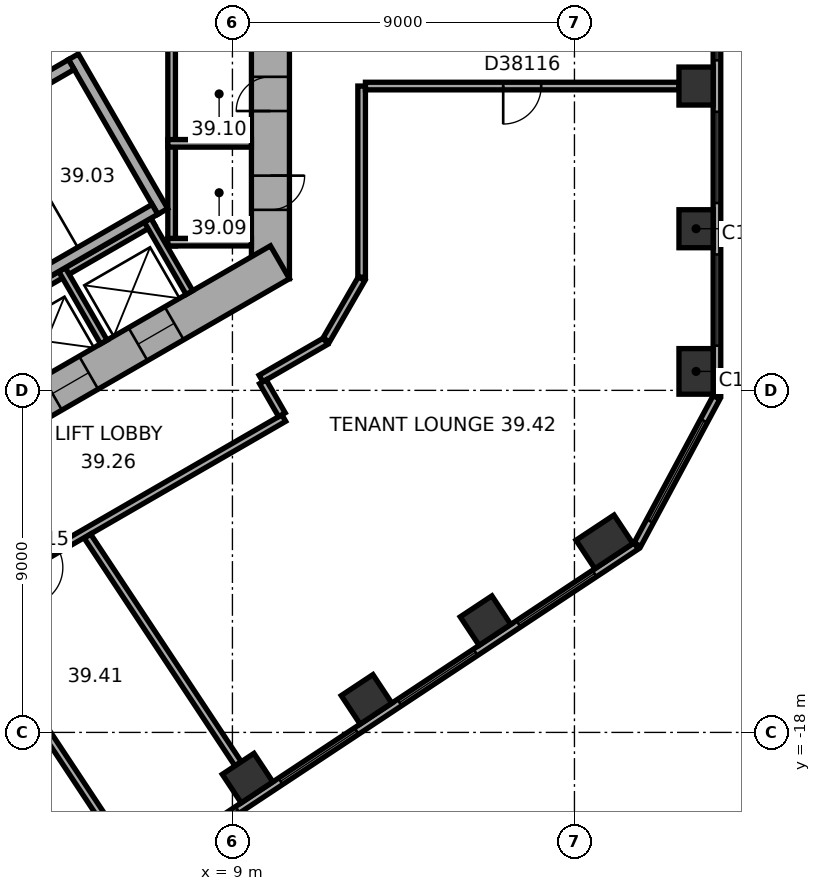
"""IFC4 building model, lengths in metres.
Left out: names, types, materials, properties, quantities, classifications, styles, units other than length and angle.
Written with IfcOpenShell. Run it as: python <this file> out.ifc"""

import sys

from ifc_helpers import new_model, si_unit, direction, frame, frame_2d, origin, origin_2d, place, context, subcontext, project, spatial, rectangle, extrude, element, fill, save


model = new_model("IFC4")
c1 = context("Model", 3, precision=1e-05, world=origin(), true_north=direction((0.0, 1.0)))
c2 = subcontext(c1, "Body", "Model", "MODEL_VIEW")
j1 = project(units=[si_unit("LENGTHUNIT", "METRE"), si_unit("PLANEANGLEUNIT", "RADIAN")], contexts=[c1])
p1 = place(None, origin())
s1 = spatial("IfcSite", under=j1, at=p1, CompositionType="ELEMENT")
p2 = place(p1, origin())
s2 = spatial("IfcBuilding", under=s1, at=p2, CompositionType="ELEMENT")
p3 = place(p2, frame((0.0, 0.0, 161.4)))
s3 = spatial("IfcBuildingStorey", under=s2, at=p3, CompositionType="ELEMENT", Elevation=161.4)
p4 = place(p3, frame((21.2, -8.501, 0.0), z_axis=(0.0, 0.0, 1.0), x_axis=(0.0, 1.0, 0.0)))
e1 = element("IfcColumn", 1, at=p4, inside=s3, PredefinedType="COLUMN", context=c2, shape_type="SweptSolid", body=[
    extrude(rectangle(XDim=1.2, YDim=0.9, at=origin_2d()), origin(), (0.0, 0.0, 1.0), 3.7),
])
for number, where, z_axis, x_axis in (
    (2, (21.2, -4.747, 0.0), (0.0, 0.0, 1.0), (0.0, 1.0, 0.0)),
    (3, (21.2, -0.993, 0.0), (0.0, 0.0, 1.0), (0.0, 1.0, 0.0)),
    (4, (9.398, -19.202, 0.0), (0.0, 0.0, 1.0), (0.834, 0.552, 0.0)),
    (5, (12.529, -17.13, 0.0), (0.0, 0.0, 1.0), (0.834, 0.552, 0.0)),
    (6, (15.659, -15.058, 0.0), (0.0, 0.0, 1.0), (0.834, 0.552, 0.0)),
):
    element("IfcColumn", number, at=place(p3, frame(where, z_axis=z_axis, x_axis=x_axis)), inside=s3, PredefinedType="COLUMN", context=c2, shape_type="SweptSolid", body=[
        extrude(rectangle(XDim=1.0, YDim=0.9, at=origin_2d()), origin(), (0.0, 0.0, 1.0), 3.7),
    ])
p5 = place(p3, frame((18.79, -12.986, 0.0), z_axis=(0.0, 0.0, 1.0), x_axis=(0.833885822067, 0.551936985312, 0.0)))
e7 = element("IfcColumn", 7, at=p5, inside=s3, PredefinedType="COLUMN", context=c2, shape_type="SweptSolid", body=[
    extrude(rectangle(XDim=1.2, YDim=0.9, at=origin_2d()), origin(), (0.0, 0.0, 1.0), 3.7),
])
p6 = place(p3, frame((10.0, -6.062, 0.0), z_axis=(0.0, 0.0, 1.0), x_axis=(0.0, 1.0, 0.0)))
e8 = element("IfcWall", 8, at=p6, inside=s3, PredefinedType="SHEAR", context=c2, shape_type="SweptSolid", body=[
    extrude(rectangle(XDim=12.125, YDim=1.0, at=frame_2d((6.062, 0.0))), origin(), (0.0, 0.0, 1.0), 3.7),
])
p7 = place(p6, frame((6.262, 0.0, 0.0)))
e9 = element("IfcOpeningElement", 9, at=p7, cuts=e8, PredefinedType="OPENING", context=c2, shape_type="SweptSolid", body=[
    extrude(rectangle(XDim=1.5, YDim=2.1, at=frame_2d((0.75, 1.05))), frame((0.0, 0.51, 0.0), z_axis=(0.0, -1.0, 0.0), x_axis=(1.0, 0.0, 0.0)), (0.0, 0.0, 1.0), 1.02),
])
p8 = place(p6, frame((1.812, 0.0, 0.0)))
e10 = element("IfcOpeningElement", 10, at=p8, cuts=e8, PredefinedType="OPENING", context=c2, shape_type="SweptSolid", body=[
    extrude(rectangle(XDim=0.9, YDim=2.1, at=frame_2d((0.45, 1.05))), frame((0.0, 0.51, 0.0), z_axis=(0.0, -1.0, 0.0), x_axis=(1.0, 0.0, 0.0)), (0.0, 0.0, 1.0), 1.02),
])
p9 = place(p6, frame((4.412, 0.0, 0.0)))
e11 = element("IfcOpeningElement", 11, at=p9, cuts=e8, PredefinedType="OPENING", context=c2, shape_type="SweptSolid", body=[
    extrude(rectangle(XDim=0.9, YDim=2.1, at=frame_2d((0.45, 1.05))), frame((0.0, 0.51, 0.0), z_axis=(0.0, -1.0, 0.0), x_axis=(1.0, 0.0, 0.0)), (0.0, 0.0, 1.0), 1.02),
])
p10 = place(p3, frame((-0.25, -11.691, 0.0), z_axis=(0.0, 0.0, 1.0), x_axis=(0.866022616891, 0.50000482701, 0.0)))
e12 = element("IfcWall", 12, at=p10, inside=s3, PredefinedType="SHEAR", context=c2, shape_type="SweptSolid", body=[
    extrude(rectangle(XDim=12.125, YDim=1.0, at=frame_2d((6.062, 0.0))), origin(), (0.0, 0.0, 1.0), 3.7),
])
p11 = place(p10, frame((2.612, 0.0, 0.0)))
e13 = element("IfcOpeningElement", 13, at=p11, cuts=e12, PredefinedType="OPENING", context=c2, shape_type="SweptSolid", body=[
    extrude(rectangle(XDim=1.1, YDim=2.1, at=frame_2d((0.55, 1.05))), frame((0.0, 0.51, 0.0), z_axis=(0.0, -1.0, 0.0), x_axis=(1.0, 0.0, 0.0)), (0.0, 0.0, 1.0), 1.02),
])
p12 = place(p10, frame((5.212, 0.0, 0.0)))
e14 = element("IfcOpeningElement", 14, at=p12, cuts=e12, PredefinedType="OPENING", context=c2, shape_type="SweptSolid", body=[
    extrude(rectangle(XDim=1.1, YDim=2.1, at=frame_2d((0.55, 1.05))), frame((0.0, 0.51, 0.0), z_axis=(0.0, -1.0, 0.0), x_axis=(1.0, 0.0, 0.0)), (0.0, 0.0, 1.0), 1.02),
])
p13 = place(p10, frame((7.812, 0.0, 0.0)))
e15 = element("IfcOpeningElement", 15, at=p13, cuts=e12, PredefinedType="OPENING", context=c2, shape_type="SweptSolid", body=[
    extrude(rectangle(XDim=1.1, YDim=2.1, at=frame_2d((0.55, 1.05))), frame((0.0, 0.51, 0.0), z_axis=(0.0, -1.0, 0.0), x_axis=(1.0, 0.0, 0.0)), (0.0, 0.0, 1.0), 1.02),
])
p14 = place(p3, frame((21.75, -9.138, 0.0), z_axis=(0.0, 0.0, 1.0), x_axis=(0.0, 1.0, 0.0)))
e16 = element("IfcWall", 16, at=p14, inside=s3, PredefinedType="STANDARD", context=c2, shape_type="SweptSolid", body=[
    extrude(rectangle(XDim=20.044, YDim=0.2, at=frame_2d((10.022, 0.0))), origin(), (0.0, 0.0, 1.0), 3.7),
])
p15 = place(p14, frame((1.314, 0.0, 0.9)))
e17 = element("IfcOpeningElement", 17, at=p15, cuts=e16, PredefinedType="OPENING", context=c2, shape_type="SweptSolid", body=[
    extrude(rectangle(XDim=2.4, YDim=2.0, at=frame_2d((1.2, 1.0))), frame((0.0, 0.11, 0.0), z_axis=(0.0, -1.0, 0.0), x_axis=(1.0, 0.0, 0.0)), (0.0, 0.0, 1.0), 0.22),
])
p16 = place(p14, frame((5.069, 0.0, 0.9)))
e18 = element("IfcOpeningElement", 18, at=p16, cuts=e16, PredefinedType="OPENING", context=c2, shape_type="SweptSolid", body=[
    extrude(rectangle(XDim=2.4, YDim=2.0, at=frame_2d((1.2, 1.0))), frame((0.0, 0.11, 0.0), z_axis=(0.0, -1.0, 0.0), x_axis=(1.0, 0.0, 0.0)), (0.0, 0.0, 1.0), 0.22),
])
p17 = place(p14, frame((8.823, 0.0, 0.9)))
e19 = element("IfcOpeningElement", 19, at=p17, cuts=e16, PredefinedType="OPENING", context=c2, shape_type="SweptSolid", body=[
    extrude(rectangle(XDim=2.4, YDim=2.0, at=frame_2d((1.2, 1.0))), frame((0.0, 0.11, 0.0), z_axis=(0.0, -1.0, 0.0), x_axis=(1.0, 0.0, 0.0)), (0.0, 0.0, 1.0), 0.22),
])
p18 = place(p14, frame((12.577, 0.0, 0.9)))
e20 = element("IfcOpeningElement", 20, at=p18, cuts=e16, PredefinedType="OPENING", context=c2, shape_type="SweptSolid", body=[
    extrude(rectangle(XDim=2.4, YDim=2.0, at=frame_2d((1.2, 1.0))), frame((0.0, 0.11, 0.0), z_axis=(0.0, -1.0, 0.0), x_axis=(1.0, 0.0, 0.0)), (0.0, 0.0, 1.0), 0.22),
])
p19 = place(p14, frame((16.331, 0.0, 0.9)))
e21 = element("IfcOpeningElement", 21, at=p19, cuts=e16, PredefinedType="OPENING", context=c2, shape_type="SweptSolid", body=[
    extrude(rectangle(XDim=2.4, YDim=2.0, at=frame_2d((1.2, 1.0))), frame((0.0, 0.11, 0.0), z_axis=(0.0, -1.0, 0.0), x_axis=(1.0, 0.0, 0.0)), (0.0, 0.0, 1.0), 0.22),
])
p20 = place(p3, frame((2.911, -24.156, 0.0), z_axis=(0.0, 0.0, 1.0), x_axis=(0.833882163564, 0.551942512668, 0.0)))
e22 = element("IfcWall", 22, at=p20, inside=s3, PredefinedType="STANDARD", context=c2, shape_type="SweptSolid", body=[
    extrude(rectangle(XDim=20.044, YDim=0.2, at=frame_2d((10.022, 0.0))), origin(), (0.0, 0.0, 1.0), 3.7),
])
p21 = place(p20, frame((1.313, 0.0, 0.9)))
e23 = element("IfcOpeningElement", 23, at=p21, cuts=e22, PredefinedType="OPENING", context=c2, shape_type="SweptSolid", body=[
    extrude(rectangle(XDim=2.4, YDim=2.0, at=frame_2d((1.2, 1.0))), frame((0.0, 0.11, 0.0), z_axis=(0.0, -1.0, 0.0), x_axis=(1.0, 0.0, 0.0)), (0.0, 0.0, 1.0), 0.22),
])
p22 = place(p20, frame((5.067, 0.0, 0.9)))
e24 = element("IfcOpeningElement", 24, at=p22, cuts=e22, PredefinedType="OPENING", context=c2, shape_type="SweptSolid", body=[
    extrude(rectangle(XDim=2.4, YDim=2.0, at=frame_2d((1.2, 1.0))), frame((0.0, 0.11, 0.0), z_axis=(0.0, -1.0, 0.0), x_axis=(1.0, 0.0, 0.0)), (0.0, 0.0, 1.0), 0.22),
])
p23 = place(p20, frame((8.821, 0.0, 0.9)))
e25 = element("IfcOpeningElement", 25, at=p23, cuts=e22, PredefinedType="OPENING", context=c2, shape_type="SweptSolid", body=[
    extrude(rectangle(XDim=2.4, YDim=2.0, at=frame_2d((1.2, 1.0))), frame((0.0, 0.11, 0.0), z_axis=(0.0, -1.0, 0.0), x_axis=(1.0, 0.0, 0.0)), (0.0, 0.0, 1.0), 0.22),
])
p24 = place(p20, frame((12.575, 0.0, 0.9)))
e26 = element("IfcOpeningElement", 26, at=p24, cuts=e22, PredefinedType="OPENING", context=c2, shape_type="SweptSolid", body=[
    extrude(rectangle(XDim=2.4, YDim=2.0, at=frame_2d((1.2, 1.0))), frame((0.0, 0.11, 0.0), z_axis=(0.0, -1.0, 0.0), x_axis=(1.0, 0.0, 0.0)), (0.0, 0.0, 1.0), 0.22),
])
p25 = place(p20, frame((16.329, 0.0, 0.9)))
e27 = element("IfcOpeningElement", 27, at=p25, cuts=e22, PredefinedType="OPENING", context=c2, shape_type="SweptSolid", body=[
    extrude(rectangle(XDim=2.4, YDim=2.0, at=frame_2d((1.2, 1.0))), frame((0.0, 0.11, 0.0), z_axis=(0.0, -1.0, 0.0), x_axis=(1.0, 0.0, 0.0)), (0.0, 0.0, 1.0), 0.22),
])
p26 = place(p3, frame((19.658, -13.057, 0.0), z_axis=(0.0, 0.0, 1.0), x_axis=(0.473307879841, 0.880897071672, 0.0)))
e28 = element("IfcWall", 28, at=p26, inside=s3, PredefinedType="STANDARD", context=c2, shape_type="SweptSolid", body=[
    extrude(rectangle(XDim=4.395, YDim=0.2, at=frame_2d((2.197, 0.0))), origin(), (0.0, 0.0, 1.0), 3.7),
])
p27 = place(p26, frame((0.698, 0.0, 0.9)))
e29 = element("IfcOpeningElement", 29, at=p27, cuts=e28, PredefinedType="OPENING", context=c2, shape_type="SweptSolid", body=[
    extrude(rectangle(XDim=3.0, YDim=2.0, at=frame_2d((1.5, 1.0))), frame((0.0, 0.11, 0.0), z_axis=(0.0, -1.0, 0.0), x_axis=(1.0, 0.0, 0.0)), (0.0, 0.0, 1.0), 0.22),
])
p28 = place(p3, frame((7.4, -5.2, 0.0), z_axis=(0.0, 0.0, 1.0), x_axis=(0.0, 1.0, 0.0)))
e30 = element("IfcWall", 30, at=p28, inside=s3, PredefinedType="PARTITIONING", context=c2, shape_type="SweptSolid", body=[
    extrude(rectangle(XDim=5.4, YDim=0.2, at=frame_2d((2.7, 0.0))), origin(), (0.0, 0.0, 1.0), 3.42),
])
for number, where, z_axis, x_axis in (
    (31, (7.3, -5.1, 0.0), (0.0, 0.0, 1.0), (1.0, 0.0, 0.0)),
    (32, (7.3, -2.5, 0.0), (0.0, 0.0, 1.0), (1.0, 0.0, 0.0)),
):
    element("IfcWall", number, at=place(p3, frame(where, z_axis=z_axis, x_axis=x_axis)), inside=s3, PredefinedType="PARTITIONING", context=c2, shape_type="SweptSolid", body=[
        extrude(rectangle(XDim=2.2, YDim=0.2, at=frame_2d((1.1, 0.0))), origin(), (0.0, 0.0, 1.0), 3.42),
    ])
p29 = place(p3, frame((-0.024, -8.559, 0.0), z_axis=(0.0, 0.0, 1.0), x_axis=(0.866026010844, 0.49999894854, 0.0)))
e33 = element("IfcWall", 33, at=p29, inside=s3, PredefinedType="PARTITIONING", context=c2, shape_type="SweptSolid", body=[
    extrude(rectangle(XDim=8.0, YDim=0.2, at=frame_2d((4.0, 0.0))), origin(), (0.0, 0.0, 1.0), 3.42),
])
for number, where, z_axis, x_axis in (
    (34, (4.516, -5.822, 0.0), (0.0, 0.0, 1.0), (0.5, -0.866, 0.0)),
    (35, (6.768, -4.522, 0.0), (0.0, 0.0, 1.0), (0.5, -0.866, 0.0)),
):
    element("IfcWall", number, at=place(p3, frame(where, z_axis=z_axis, x_axis=x_axis)), inside=s3, PredefinedType="PARTITIONING", context=c2, shape_type="SweptSolid", body=[
        extrude(rectangle(XDim=2.2, YDim=0.2, at=frame_2d((1.1, 0.0))), origin(), (0.0, 0.0, 1.0), 3.42),
    ])
p30 = place(p3, frame((4.816, -0.222, 0.0), z_axis=(0.0, 0.0, 1.0), x_axis=(0.499977259774, -0.866038532462, 0.0)))
e36 = element("IfcWall", 36, at=p30, inside=s3, PredefinedType="SHEAR", context=c2, shape_type="SweptSolid", body=[
    extrude(rectangle(XDim=4.7, YDim=0.3, at=frame_2d((2.35, 0.0))), origin(), (0.0, 0.0, 1.0), 3.42),
])
for number, where, z_axis, x_axis in (
    (37, (-1.353, -3.957, 0.0), (0.0, 0.0, 1.0), (0.866, 0.5, 0.0)),
    (38, (0.847, -7.767, 0.0), (0.0, 0.0, 1.0), (0.866, 0.5, 0.0)),
):
    element("IfcWall", number, at=place(p3, frame(where, z_axis=z_axis, x_axis=x_axis)), inside=s3, PredefinedType="SHEAR", context=c2, shape_type="SweptSolid", body=[
        extrude(rectangle(XDim=7.06, YDim=0.3, at=frame_2d((3.53, 0.0))), origin(), (0.0, 0.0, 1.0), 3.42),
    ])
p31 = place(p3, frame((2.816, -14.079, 0.0), z_axis=(0.0, 0.0, 1.0), x_axis=(0.866021128829, 0.500007404367, 0.0)))
e39 = element("IfcWall", 39, at=p31, inside=s3, PredefinedType="PARTITIONING", context=c2, shape_type="SweptSolid", body=[
    extrude(rectangle(XDim=8.702, YDim=0.2, at=frame_2d((4.351, 0.0))), origin(), (0.0, 0.0, 1.0), 3.42),
])
p32 = place(p31, frame((0.833, 0.0, 0.0)))
e40 = element("IfcOpeningElement", 40, at=p32, cuts=e39, PredefinedType="OPENING", context=c2, shape_type="SweptSolid", body=[
    extrude(rectangle(XDim=1.0, YDim=2.1, at=frame_2d((0.5, 1.05))), frame((0.0, 0.11, 0.0), z_axis=(0.0, -1.0, 0.0), x_axis=(1.0, 0.0, 0.0)), (0.0, 0.0, 1.0), 0.22),
])
p33 = place(p3, frame((6.02, -20.899, 0.0), z_axis=(0.0, 0.0, 1.0), x_axis=(-0.551943990108, 0.833881185651, 0.0)))
e41 = element("IfcWall", 41, at=p33, inside=s3, PredefinedType="PARTITIONING", context=c2, shape_type="SweptSolid", body=[
    extrude(rectangle(XDim=8.615, YDim=0.2, at=frame_2d((4.308, 0.0))), origin(), (0.0, 0.0, 1.0), 3.42),
])
p34 = place(p3, frame((9.15, -18.827, 0.0), z_axis=(0.0, 0.0, 1.0), x_axis=(-0.551928083938, 0.83389171369, 0.0)))
e42 = element("IfcWall", 42, at=p34, inside=s3, PredefinedType="PARTITIONING", context=c2, shape_type="SweptSolid", body=[
    extrude(rectangle(XDim=7.182, YDim=0.2, at=frame_2d((3.591, 0.0))), origin(), (0.0, 0.0, 1.0), 2.87),
])
p35 = place(p3, frame((9.752, -8.688, 0.0), z_axis=(0.0, 0.0, 1.0), x_axis=(0.865974105138, 0.500088841337, 0.0)))
e43 = element("IfcWall", 43, at=p35, inside=s3, PredefinedType="PARTITIONING", context=c2, shape_type="SweptSolid", body=[
    extrude(rectangle(XDim=1.961, YDim=0.2, at=frame_2d((0.98, 0.0))), origin(), (0.0, 0.0, 1.0), 3.42),
])
p36 = place(p3, frame((10.302, -9.642, 0.0), z_axis=(0.0, 0.0, 1.0), x_axis=(-0.500074377092, 0.865982457891, 0.0)))
e44 = element("IfcWall", 44, at=p36, inside=s3, PredefinedType="PARTITIONING", context=c2, shape_type="SweptSolid", body=[
    extrude(rectangle(XDim=1.001, YDim=0.2, at=frame_2d((0.5, 0.0))), origin(), (0.0, 0.0, 1.0), 3.42),
])
p37 = place(p3, frame((11.47, -7.673, 0.0), z_axis=(0.0, 0.0, 1.0), x_axis=(0.499964847546, 0.866045698112, 0.0)))
e45 = element("IfcWall", 45, at=p37, inside=s3, PredefinedType="PARTITIONING", context=c2, shape_type="SweptSolid", body=[
    extrude(rectangle(XDim=1.86, YDim=0.2, at=frame_2d((0.93, 0.0))), origin(), (0.0, 0.0, 1.0), 3.42),
])
p38 = place(p3, frame((12.4, -6.022, 0.0), z_axis=(0.0, 0.0, 1.0), x_axis=(0.0, 1.0, 0.0)))
e46 = element("IfcWall", 46, at=p38, inside=s3, PredefinedType="PARTITIONING", context=c2, shape_type="SweptSolid", body=[
    extrude(rectangle(XDim=5.029, YDim=0.2, at=frame_2d((2.515, 0.0))), origin(), (0.0, 0.0, 1.0), 3.42),
])
p39 = place(p3, frame((12.5, -0.993, 0.0), z_axis=(0.0, 0.0, 1.0), x_axis=(1.0, 0.0, 0.0)))
e47 = element("IfcWall", 47, at=p39, inside=s3, PredefinedType="PARTITIONING", context=c2, shape_type="SweptSolid", body=[
    extrude(rectangle(XDim=8.25, YDim=0.2, at=frame_2d((4.125, 0.0))), origin(), (0.0, 0.0, 1.0), 2.87),
])
p40 = place(p39, frame((3.625, 0.0, 0.0)))
e48 = element("IfcOpeningElement", 48, at=p40, cuts=e47, PredefinedType="OPENING", context=c2, shape_type="SweptSolid", body=[
    extrude(rectangle(XDim=1.0, YDim=2.1, at=frame_2d((0.5, 1.05))), frame((0.0, 0.11, 0.0), z_axis=(0.0, -1.0, 0.0), x_axis=(1.0, 0.0, 0.0)), (0.0, 0.0, 1.0), 0.22),
])
p41 = place(p15, origin())
e49 = element("IfcWindow", 49, at=p41, inside=s3, PartitioningType="SINGLE_PANEL", PredefinedType="WINDOW", context=c2, shape_type="SweptSolid", body=[
    extrude(rectangle(XDim=2.4, YDim=2.0, at=frame_2d((1.2, 1.0))), frame((0.0, 0.03, 0.0), z_axis=(0.0, -1.0, 0.0), x_axis=(1.0, 0.0, 0.0)), (0.0, 0.0, 1.0), 0.06),
])
fill(e17, e49)
p42 = place(p16, origin())
e50 = element("IfcWindow", 50, at=p42, inside=s3, PartitioningType="SINGLE_PANEL", PredefinedType="WINDOW", context=c2, shape_type="SweptSolid", body=[
    extrude(rectangle(XDim=2.4, YDim=2.0, at=frame_2d((1.2, 1.0))), frame((0.0, 0.03, 0.0), z_axis=(0.0, -1.0, 0.0), x_axis=(1.0, 0.0, 0.0)), (0.0, 0.0, 1.0), 0.06),
])
fill(e18, e50)
p43 = place(p17, origin())
e51 = element("IfcWindow", 51, at=p43, inside=s3, PartitioningType="SINGLE_PANEL", PredefinedType="WINDOW", context=c2, shape_type="SweptSolid", body=[
    extrude(rectangle(XDim=2.4, YDim=2.0, at=frame_2d((1.2, 1.0))), frame((0.0, 0.03, 0.0), z_axis=(0.0, -1.0, 0.0), x_axis=(1.0, 0.0, 0.0)), (0.0, 0.0, 1.0), 0.06),
])
fill(e19, e51)
p44 = place(p22, origin())
e52 = element("IfcWindow", 52, at=p44, inside=s3, PartitioningType="SINGLE_PANEL", PredefinedType="WINDOW", context=c2, shape_type="SweptSolid", body=[
    extrude(rectangle(XDim=2.4, YDim=2.0, at=frame_2d((1.2, 1.0))), frame((0.0, 0.03, 0.0), z_axis=(0.0, -1.0, 0.0), x_axis=(1.0, 0.0, 0.0)), (0.0, 0.0, 1.0), 0.06),
])
fill(e24, e52)
p45 = place(p23, origin())
e53 = element("IfcWindow", 53, at=p45, inside=s3, PartitioningType="SINGLE_PANEL", PredefinedType="WINDOW", context=c2, shape_type="SweptSolid", body=[
    extrude(rectangle(XDim=2.4, YDim=2.0, at=frame_2d((1.2, 1.0))), frame((0.0, 0.03, 0.0), z_axis=(0.0, -1.0, 0.0), x_axis=(1.0, 0.0, 0.0)), (0.0, 0.0, 1.0), 0.06),
])
fill(e25, e53)
p46 = place(p24, origin())
e54 = element("IfcWindow", 54, at=p46, inside=s3, PartitioningType="SINGLE_PANEL", PredefinedType="WINDOW", context=c2, shape_type="SweptSolid", body=[
    extrude(rectangle(XDim=2.4, YDim=2.0, at=frame_2d((1.2, 1.0))), frame((0.0, 0.03, 0.0), z_axis=(0.0, -1.0, 0.0), x_axis=(1.0, 0.0, 0.0)), (0.0, 0.0, 1.0), 0.06),
])
fill(e26, e54)
p47 = place(p25, origin())
e55 = element("IfcWindow", 55, at=p47, inside=s3, PartitioningType="SINGLE_PANEL", PredefinedType="WINDOW", context=c2, shape_type="SweptSolid", body=[
    extrude(rectangle(XDim=2.4, YDim=2.0, at=frame_2d((1.2, 1.0))), frame((0.0, 0.03, 0.0), z_axis=(0.0, -1.0, 0.0), x_axis=(1.0, 0.0, 0.0)), (0.0, 0.0, 1.0), 0.06),
])
fill(e27, e55)
p48 = place(p27, origin())
e56 = element("IfcWindow", 56, at=p48, inside=s3, PartitioningType="SINGLE_PANEL", PredefinedType="WINDOW", context=c2, shape_type="SweptSolid", body=[
    extrude(rectangle(XDim=3.0, YDim=2.0, at=frame_2d((1.5, 1.0))), frame((0.0, 0.03, 0.0), z_axis=(0.0, -1.0, 0.0), x_axis=(1.0, 0.0, 0.0)), (0.0, 0.0, 1.0), 0.06),
])
fill(e29, e56)
p49 = place(p8, origin())
e57 = element("IfcDoor", 57, at=p49, inside=s3, OperationType="SINGLE_SWING_LEFT", PredefinedType="DOOR", context=c2, shape_type="SweptSolid", body=[
    extrude(rectangle(XDim=0.9, YDim=2.1, at=frame_2d((0.45, 1.05))), frame((0.0, 0.025, 0.0), z_axis=(0.0, -1.0, 0.0), x_axis=(1.0, 0.0, 0.0)), (0.0, 0.0, 1.0), 0.05),
])
fill(e10, e57)
p50 = place(p9, origin())
e58 = element("IfcDoor", 58, at=p50, inside=s3, OperationType="SINGLE_SWING_LEFT", PredefinedType="DOOR", context=c2, shape_type="SweptSolid", body=[
    extrude(rectangle(XDim=0.9, YDim=2.1, at=frame_2d((0.45, 1.05))), frame((0.0, 0.025, 0.0), z_axis=(0.0, -1.0, 0.0), x_axis=(1.0, 0.0, 0.0)), (0.0, 0.0, 1.0), 0.05),
])
fill(e11, e58)
p51 = place(p12, origin())
e59 = element("IfcDoor", 59, at=p51, inside=s3, OperationType="DOUBLE_DOOR_SLIDING", PredefinedType="DOOR", context=c2, shape_type="SweptSolid", body=[
    extrude(rectangle(XDim=1.1, YDim=2.1, at=frame_2d((0.55, 1.05))), frame((0.0, 0.025, 0.0), z_axis=(0.0, -1.0, 0.0), x_axis=(1.0, 0.0, 0.0)), (0.0, 0.0, 1.0), 0.05),
])
fill(e14, e59)
p52 = place(p13, origin())
e60 = element("IfcDoor", 60, at=p52, inside=s3, OperationType="DOUBLE_DOOR_SLIDING", PredefinedType="DOOR", context=c2, shape_type="SweptSolid", body=[
    extrude(rectangle(XDim=1.1, YDim=2.1, at=frame_2d((0.55, 1.05))), frame((0.0, 0.025, 0.0), z_axis=(0.0, -1.0, 0.0), x_axis=(1.0, 0.0, 0.0)), (0.0, 0.0, 1.0), 0.05),
])
fill(e15, e60)
p53 = place(p32, origin())
e61 = element("IfcDoor", 61, at=p53, inside=s3, OperationType="SINGLE_SWING_LEFT", PredefinedType="DOOR", context=c2, shape_type="SweptSolid", body=[
    extrude(rectangle(XDim=1.0, YDim=2.1, at=frame_2d((0.5, 1.05))), frame((0.0, 0.025, 0.0), z_axis=(0.0, -1.0, 0.0), x_axis=(1.0, 0.0, 0.0)), (0.0, 0.0, 1.0), 0.05),
])
fill(e40, e61)
p54 = place(p40, origin())
e62 = element("IfcDoor", 62, at=p54, inside=s3, OperationType="SINGLE_SWING_LEFT", PredefinedType="DOOR", context=c2, shape_type="SweptSolid", body=[
    extrude(rectangle(XDim=1.0, YDim=2.1, at=frame_2d((0.5, 1.05))), frame((0.0, 0.025, 0.0), z_axis=(0.0, -1.0, 0.0), x_axis=(1.0, 0.0, 0.0)), (0.0, 0.0, 1.0), 0.05),
])
fill(e48, e62)
save(model, sys.argv[1])
